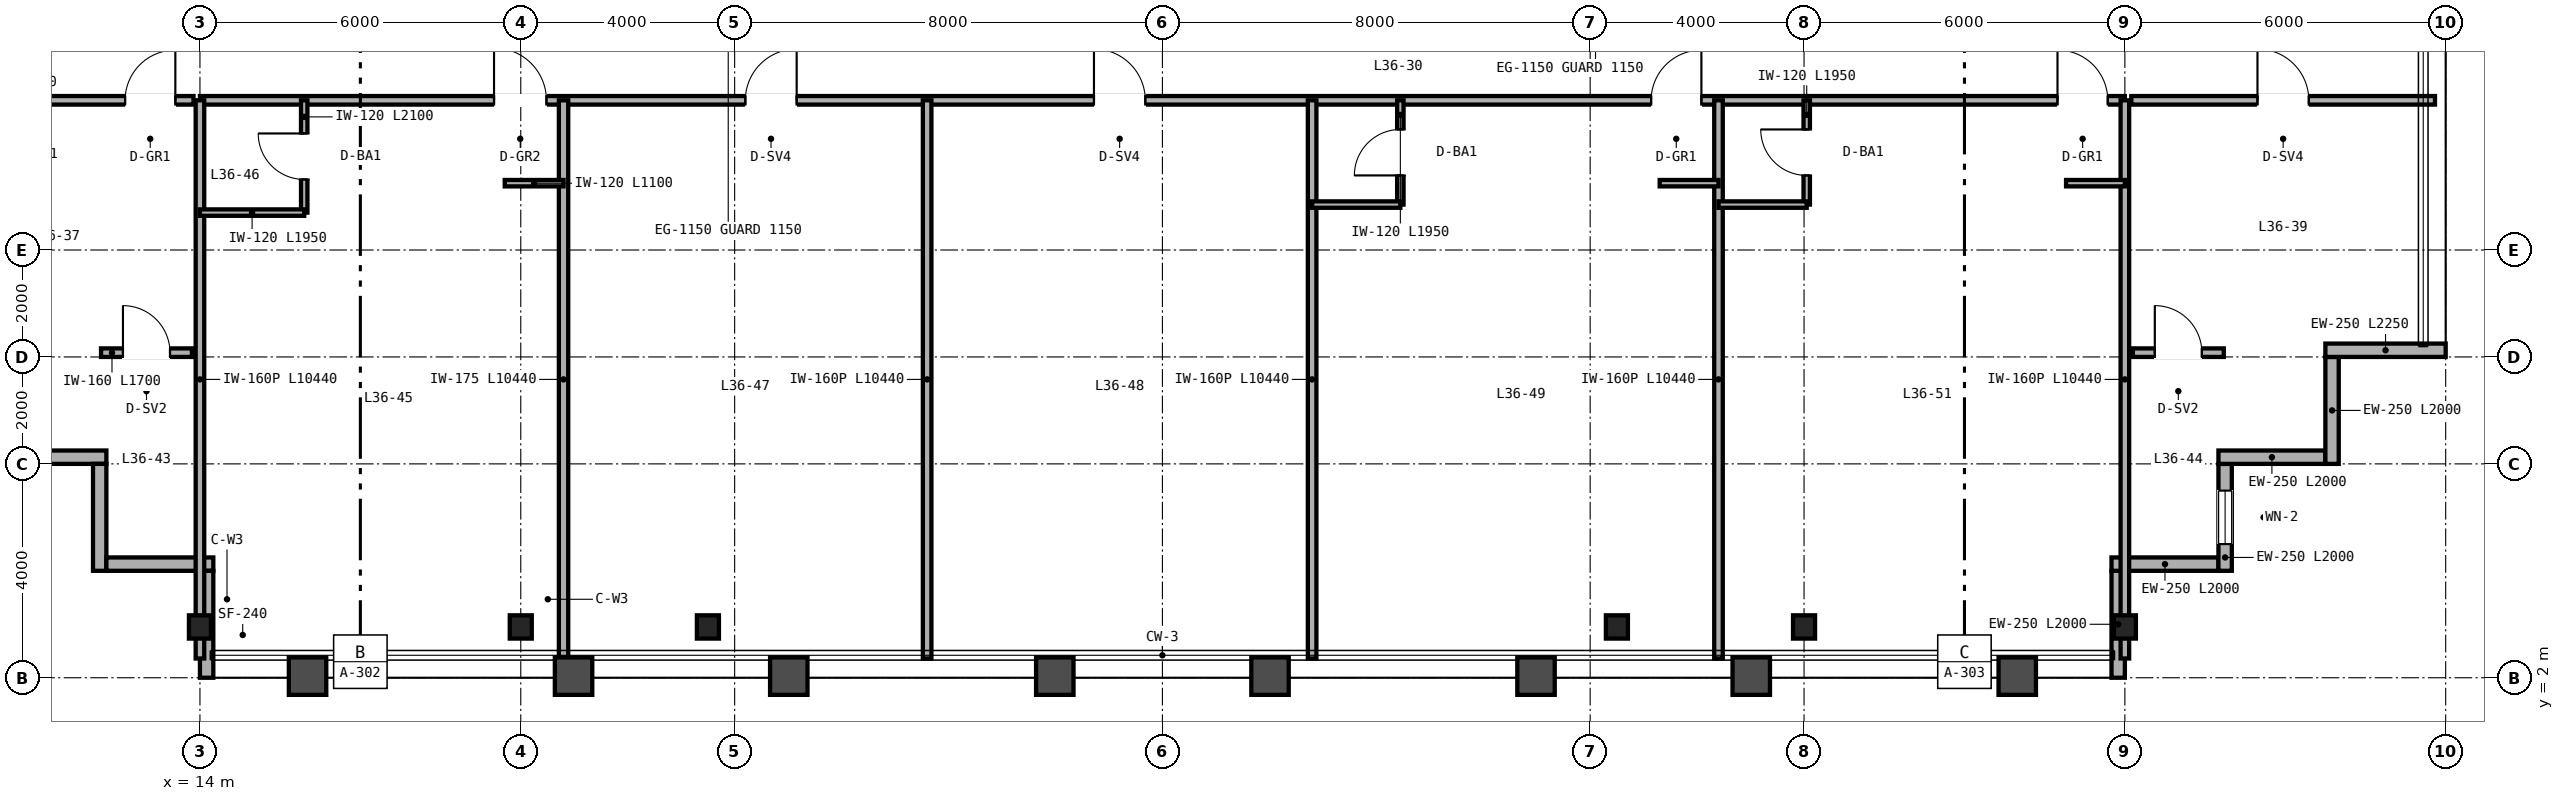
"""IFC4 building model, lengths in metres.
Left out: names, types, materials, properties, quantities, classifications, styles, units other than length and angle.
Written with IfcOpenShell. Run it as: python <this file> out.ifc"""

import sys

from ifc_helpers import new_model, si_unit, direction, frame, frame_2d, origin, origin_2d, place, context, subcontext, project, spatial, rectangle, i_section, extrude, source, transform, mapped, element, fill, save


model = new_model("IFC4")
c1 = context("Model", 3, precision=1e-05, world=origin(), true_north=direction((0.0, 1.0)))
c2 = subcontext(c1, "Body", "Model", "MODEL_VIEW")
j1 = project(units=[si_unit("LENGTHUNIT", "METRE"), si_unit("PLANEANGLEUNIT", "RADIAN")], contexts=[c1])
p1 = place(None, origin())
s1 = spatial("IfcSite", under=j1, at=p1, CompositionType="ELEMENT")
p2 = place(p1, origin())
s2 = spatial("IfcBuilding", under=s1, at=p2, CompositionType="ELEMENT")
p3 = place(p2, frame((0.0, 0.0, 144.0)))
s3 = spatial("IfcBuildingStorey", under=s2, at=p3, CompositionType="ELEMENT", Elevation=144.0)
m1 = source(origin(), c2, "Body", "SweptSolid", [
    extrude(i_section(OverallWidth=0.412, OverallDepth=0.435, WebThickness=0.036, FlangeThickness=0.057, FilletRadius=0.025, at=origin_2d()), origin(), (0.0, 0.0, 1.0), 3.36),
])
for number, where, z_axis, x_axis in (
    (1, (14.0, 2.95, 0.0), (0.0, 0.0, 1.0), (1.0, 0.0, 0.0)),
    (2, (20.0, 2.95, 0.0), (0.0, 0.0, 1.0), (1.0, 0.0, 0.0)),
    (3, (23.5, 2.95, 0.0), (0.0, 0.0, 1.0), (1.0, 0.0, 0.0)),
    (4, (40.5, 2.95, 0.0), (0.0, 0.0, 1.0), (1.0, 0.0, 0.0)),
    (5, (44.0, 2.95, 0.0), (0.0, 0.0, 1.0), (1.0, 0.0, 0.0)),
    (6, (50.0, 2.95, 0.0), (0.0, 0.0, 1.0), (1.0, 0.0, 0.0)),
):
    element("IfcColumn", number, at=place(p3, frame(where, z_axis=z_axis, x_axis=x_axis)), inside=s3, PredefinedType="COLUMN", context=c2, shape_type="MappedRepresentation", body=[
        mapped(m1, transform((0.0, 0.0, 0.0), scale=1.0)),
    ])
p4 = place(p3, frame((49.875, 2.0, 0.0), z_axis=(0.0, 0.0, 1.0), x_axis=(0.0, 1.0, 0.0)))
e7 = element("IfcWall", 7, at=p4, inside=s3, PredefinedType="SOLIDWALL", context=c2, shape_type="SweptSolid", body=[
    extrude(rectangle(XDim=2.0, YDim=0.25, at=frame_2d((1.0, 0.0))), origin(), (0.0, 0.0, 1.0), 2.667),
])
p5 = place(p3, frame((49.75, 4.125, 0.0), z_axis=(0.0, 0.0, 1.0), x_axis=(1.0, 0.0, 0.0)))
e8 = element("IfcWall", 8, at=p5, inside=s3, PredefinedType="SOLIDWALL", context=c2, shape_type="SweptSolid", body=[
    extrude(rectangle(XDim=2.0, YDim=0.25, at=frame_2d((1.0, 0.0))), origin(), (0.0, 0.0, 1.0), 3.36),
])
p6 = place(p3, frame((51.875, 4.0, 0.0), z_axis=(0.0, 0.0, 1.0), x_axis=(0.0, 1.0, 0.0)))
e9 = element("IfcWall", 9, at=p6, inside=s3, PredefinedType="SOLIDWALL", context=c2, shape_type="SweptSolid", body=[
    extrude(rectangle(XDim=2.0, YDim=0.25, at=frame_2d((1.0, 0.0))), origin(), (0.0, 0.0, 1.0), 3.36),
])
p7 = place(p6, frame((0.5, 0.0, 0.85)))
e10 = element("IfcOpeningElement", 10, at=p7, cuts=e9, PredefinedType="OPENING", context=c2, shape_type="SweptSolid", body=[
    extrude(rectangle(XDim=1.0, YDim=1.9, at=frame_2d((0.5, 0.95))), frame((0.0, 0.135, 0.0), z_axis=(0.0, -1.0, 0.0), x_axis=(1.0, 0.0, 0.0)), (0.0, 0.0, 1.0), 0.27),
])
for number, where, z_axis, x_axis in (
    (11, (51.75, 6.125, 0.0), (0.0, 0.0, 1.0), (1.0, 0.0, 0.0)),
    (12, (53.875, 6.0, 0.0), (0.0, 0.0, 1.0), (0.0, 1.0, 0.0)),
):
    element("IfcWall", number, at=place(p3, frame(where, z_axis=z_axis, x_axis=x_axis)), inside=s3, PredefinedType="SOLIDWALL", context=c2, shape_type="SweptSolid", body=[
        extrude(rectangle(XDim=2.0, YDim=0.25, at=frame_2d((1.0, 0.0))), origin(), (0.0, 0.0, 1.0), 3.36),
    ])
p8 = place(p3, frame((53.75, 8.125, 0.0), z_axis=(0.0, 0.0, 1.0), x_axis=(1.0, 0.0, 0.0)))
e13 = element("IfcWall", 13, at=p8, inside=s3, PredefinedType="SOLIDWALL", context=c2, shape_type="SweptSolid", body=[
    extrude(rectangle(XDim=2.25, YDim=0.25, at=frame_2d((1.125, 0.0))), origin(), (0.0, 0.0, 1.0), 3.36),
])
for number, where, z_axis, x_axis in (
    (14, (10.25, 6.125, 0.0), (0.0, 0.0, 1.0), (1.0, 0.0, 0.0)),
    (15, (12.125, 6.0, 0.0), (0.0, 0.0, 1.0), (0.0, -1.0, 0.0)),
    (16, (12.25, 4.125, 0.0), (0.0, 0.0, 1.0), (1.0, 0.0, 0.0)),
):
    element("IfcWall", number, at=place(p3, frame(where, z_axis=z_axis, x_axis=x_axis)), inside=s3, PredefinedType="SOLIDWALL", context=c2, shape_type="SweptSolid", body=[
        extrude(rectangle(XDim=2.0, YDim=0.25, at=frame_2d((1.0, 0.0))), origin(), (0.0, 0.0, 1.0), 3.36),
    ])
p9 = place(p3, frame((14.125, 4.0, 0.0), z_axis=(0.0, 0.0, 1.0), x_axis=(0.0, -1.0, 0.0)))
e17 = element("IfcWall", 17, at=p9, inside=s3, PredefinedType="SOLIDWALL", context=c2, shape_type="SweptSolid", body=[
    extrude(rectangle(XDim=2.0, YDim=0.25, at=frame_2d((1.0, 0.0))), origin(), (0.0, 0.0, 1.0), 2.667),
])
p10 = place(p3, frame((8.2, 12.8, 0.0), z_axis=(0.0, 0.0, 1.0), x_axis=(1.0, 0.0, 0.0)))
e18 = element("IfcWall", 18, at=p10, inside=s3, PredefinedType="PARTITIONING", context=c2, shape_type="SweptSolid", body=[
    extrude(rectangle(XDim=5.68, YDim=0.16, at=frame_2d((2.84, 0.0))), origin(), (0.0, 0.0, 1.0), 3.36),
])
p11 = place(p10, frame((4.4, 0.0, 0.0)))
e19 = element("IfcOpeningElement", 19, at=p11, cuts=e18, PredefinedType="OPENING", context=c2, shape_type="SweptSolid", body=[
    extrude(rectangle(XDim=0.94, YDim=2.15, at=frame_2d((0.47, 1.075))), frame((0.0, 0.09, 0.0), z_axis=(0.0, -1.0, 0.0), x_axis=(1.0, 0.0, 0.0)), (0.0, 0.0, 1.0), 0.18),
])
p12 = place(p3, frame((50.12, 12.8, 0.0), z_axis=(0.0, 0.0, 1.0), x_axis=(1.0, 0.0, 0.0)))
e20 = element("IfcWall", 20, at=p12, inside=s3, PredefinedType="PARTITIONING", context=c2, shape_type="SweptSolid", body=[
    extrude(rectangle(XDim=5.68, YDim=0.16, at=frame_2d((2.84, 0.0))), origin(), (0.0, 0.0, 1.0), 3.36),
])
p13 = place(p12, frame((2.36, 0.0, 0.0)))
e21 = element("IfcOpeningElement", 21, at=p13, cuts=e20, PredefinedType="OPENING", context=c2, shape_type="SweptSolid", body=[
    extrude(rectangle(XDim=0.96, YDim=2.15, at=frame_2d((0.48, 1.075))), frame((0.0, 0.09, 0.0), z_axis=(0.0, -1.0, 0.0), x_axis=(1.0, 0.0, 0.0)), (0.0, 0.0, 1.0), 0.18),
])
p14 = place(p3, frame((12.15, 8.08, 0.0), z_axis=(0.0, 0.0, 1.0), x_axis=(1.0, 0.0, 0.0)))
e22 = element("IfcWall", 22, at=p14, inside=s3, PredefinedType="PARTITIONING", context=c2, shape_type="SweptSolid", body=[
    extrude(rectangle(XDim=1.7, YDim=0.16, at=frame_2d((0.85, 0.0))), origin(), (0.0, 0.0, 1.0), 3.36),
])
p15 = place(p14, frame((0.41, 0.0, 0.0)))
e23 = element("IfcOpeningElement", 23, at=p15, cuts=e22, PredefinedType="OPENING", context=c2, shape_type="SweptSolid", body=[
    extrude(rectangle(XDim=0.88, YDim=2.15, at=frame_2d((0.44, 1.075))), frame((0.0, 0.09, 0.0), z_axis=(0.0, -1.0, 0.0), x_axis=(1.0, 0.0, 0.0)), (0.0, 0.0, 1.0), 0.18),
])
p16 = place(p3, frame((50.15, 8.08, 0.0), z_axis=(0.0, 0.0, 1.0), x_axis=(1.0, 0.0, 0.0)))
e24 = element("IfcWall", 24, at=p16, inside=s3, PredefinedType="PARTITIONING", context=c2, shape_type="SweptSolid", body=[
    extrude(rectangle(XDim=1.7, YDim=0.16, at=frame_2d((0.85, 0.0))), origin(), (0.0, 0.0, 1.0), 3.36),
])
p17 = place(p16, frame((0.41, 0.0, 0.0)))
e25 = element("IfcOpeningElement", 25, at=p17, cuts=e24, PredefinedType="OPENING", context=c2, shape_type="SweptSolid", body=[
    extrude(rectangle(XDim=0.88, YDim=2.15, at=frame_2d((0.44, 1.075))), frame((0.0, 0.09, 0.0), z_axis=(0.0, -1.0, 0.0), x_axis=(1.0, 0.0, 0.0)), (0.0, 0.0, 1.0), 0.18),
])
p18 = place(p3, frame((14.0, 12.8, 0.0), z_axis=(0.0, 0.0, 1.0), x_axis=(1.0, 0.0, 0.0)))
e26 = element("IfcWall", 26, at=p18, inside=s3, PredefinedType="PARTITIONING", context=c2, shape_type="SweptSolid", body=[
    extrude(rectangle(XDim=36.0, YDim=0.16, at=frame_2d((18.0, 0.0))), origin(), (0.0, 0.0, 1.0), 2.581),
])
p19 = place(p18, frame((5.5, 0.0, 0.0)))
e27 = element("IfcOpeningElement", 27, at=p19, cuts=e26, PredefinedType="OPENING", context=c2, shape_type="SweptSolid", body=[
    extrude(rectangle(XDim=0.98, YDim=2.2, at=frame_2d((0.49, 1.1))), frame((0.0, 0.09, 0.0), z_axis=(0.0, -1.0, 0.0), x_axis=(1.0, 0.0, 0.0)), (0.0, 0.0, 1.0), 0.18),
])
p20 = place(p18, frame((10.2, 0.0, 0.0)))
e28 = element("IfcOpeningElement", 28, at=p20, cuts=e26, PredefinedType="OPENING", context=c2, shape_type="SweptSolid", body=[
    extrude(rectangle(XDim=0.96, YDim=2.15, at=frame_2d((0.48, 1.075))), frame((0.0, 0.09, 0.0), z_axis=(0.0, -1.0, 0.0), x_axis=(1.0, 0.0, 0.0)), (0.0, 0.0, 1.0), 0.18),
])
p21 = place(p18, frame((16.72, 0.0, 0.0)))
e29 = element("IfcOpeningElement", 29, at=p21, cuts=e26, PredefinedType="OPENING", context=c2, shape_type="SweptSolid", body=[
    extrude(rectangle(XDim=0.96, YDim=2.15, at=frame_2d((0.48, 1.075))), frame((0.0, 0.09, 0.0), z_axis=(0.0, -1.0, 0.0), x_axis=(1.0, 0.0, 0.0)), (0.0, 0.0, 1.0), 0.18),
])
p22 = place(p18, frame((27.14, 0.0, 0.0)))
e30 = element("IfcOpeningElement", 30, at=p22, cuts=e26, PredefinedType="OPENING", context=c2, shape_type="SweptSolid", body=[
    extrude(rectangle(XDim=0.94, YDim=2.15, at=frame_2d((0.47, 1.075))), frame((0.0, 0.09, 0.0), z_axis=(0.0, -1.0, 0.0), x_axis=(1.0, 0.0, 0.0)), (0.0, 0.0, 1.0), 0.18),
])
p23 = place(p18, frame((34.74, 0.0, 0.0)))
e31 = element("IfcOpeningElement", 31, at=p23, cuts=e26, PredefinedType="OPENING", context=c2, shape_type="SweptSolid", body=[
    extrude(rectangle(XDim=0.94, YDim=2.15, at=frame_2d((0.47, 1.075))), frame((0.0, 0.09, 0.0), z_axis=(0.0, -1.0, 0.0), x_axis=(1.0, 0.0, 0.0)), (0.0, 0.0, 1.0), 0.18),
])
for number, where, z_axis, x_axis in (
    (32, (14.0, 2.36, 0.0), (0.0, 0.0, 1.0), (0.0, 1.0, 0.0)),
    (33, (50.0, 2.36, 0.0), (0.0, 0.0, 1.0), (0.0, 1.0, 0.0)),
):
    element("IfcWall", number, at=place(p3, frame(where, z_axis=z_axis, x_axis=x_axis)), inside=s3, PredefinedType="PARTITIONING", context=c2, shape_type="SweptSolid", body=[
        extrude(rectangle(XDim=10.44, YDim=0.16, at=frame_2d((5.22, 0.0))), origin(), (0.0, 0.0, 1.0), 2.667),
    ])
p24 = place(p3, frame((20.8, 2.36, 0.0), z_axis=(0.0, 0.0, 1.0), x_axis=(0.0, 1.0, 0.0)))
e34 = element("IfcWall", 34, at=p24, inside=s3, PredefinedType="PARTITIONING", context=c2, shape_type="SweptSolid", body=[
    extrude(rectangle(XDim=10.44, YDim=0.175, at=frame_2d((5.22, 0.0))), origin(), (0.0, 0.0, 1.0), 2.823),
])
p25 = place(p3, frame((15.95, 10.7, 0.0), z_axis=(0.0, 0.0, 1.0), x_axis=(0.0, 1.0, 0.0)))
e35 = element("IfcWall", 35, at=p25, inside=s3, PredefinedType="PARTITIONING", context=c2, shape_type="SweptSolid", body=[
    extrude(rectangle(XDim=2.1, YDim=0.12, at=frame_2d((1.05, 0.0))), origin(), (0.0, 0.0, 1.0), 3.36),
])
p26 = place(p25, frame((0.62, 0.0, 0.0)))
e36 = element("IfcOpeningElement", 36, at=p26, cuts=e35, PredefinedType="OPENING", context=c2, shape_type="SweptSolid", body=[
    extrude(rectangle(XDim=0.86, YDim=2.1, at=frame_2d((0.43, 1.05))), frame((0.0, 0.07, 0.0), z_axis=(0.0, -1.0, 0.0), x_axis=(1.0, 0.0, 0.0)), (0.0, 0.0, 1.0), 0.14),
])
p27 = place(p3, frame((14.0, 10.7, 0.0), z_axis=(0.0, 0.0, 1.0), x_axis=(1.0, 0.0, 0.0)))
e37 = element("IfcWall", 37, at=p27, inside=s3, PredefinedType="PARTITIONING", context=c2, shape_type="SweptSolid", body=[
    extrude(rectangle(XDim=1.95, YDim=0.12, at=frame_2d((0.975, 0.0))), origin(), (0.0, 0.0, 1.0), 3.36),
])
p28 = place(p3, frame((19.7, 11.25, 0.0), z_axis=(0.0, 0.0, 1.0), x_axis=(1.0, 0.0, 0.0)))
e38 = element("IfcWall", 38, at=p28, inside=s3, PredefinedType="PARTITIONING", context=c2, shape_type="SweptSolid", body=[
    extrude(rectangle(XDim=1.1, YDim=0.12, at=frame_2d((0.55, 0.0))), origin(), (0.0, 0.0, 1.0), 3.36),
])
for number, where, z_axis, x_axis in (
    (39, (27.6, 2.36, 0.0), (0.0, 0.0, 1.0), (0.0, 1.0, 0.0)),
    (40, (34.8, 2.36, 0.0), (0.0, 0.0, 1.0), (0.0, 1.0, 0.0)),
):
    element("IfcWall", number, at=place(p3, frame(where, z_axis=z_axis, x_axis=x_axis)), inside=s3, PredefinedType="PARTITIONING", context=c2, shape_type="SweptSolid", body=[
        extrude(rectangle(XDim=10.44, YDim=0.16, at=frame_2d((5.22, 0.0))), origin(), (0.0, 0.0, 1.0), 2.433),
    ])
p29 = place(p3, frame((42.4, 2.36, 0.0), z_axis=(0.0, 0.0, 1.0), x_axis=(0.0, 1.0, 0.0)))
e41 = element("IfcWall", 41, at=p29, inside=s3, PredefinedType="PARTITIONING", context=c2, shape_type="SweptSolid", body=[
    extrude(rectangle(XDim=10.44, YDim=0.16, at=frame_2d((5.22, 0.0))), origin(), (0.0, 0.0, 1.0), 2.823),
])
p30 = place(p3, frame((36.45, 10.85, 0.0), z_axis=(0.0, 0.0, 1.0), x_axis=(0.0, 1.0, 0.0)))
e42 = element("IfcWall", 42, at=p30, inside=s3, PredefinedType="PARTITIONING", context=c2, shape_type="SweptSolid", body=[
    extrude(rectangle(XDim=1.95, YDim=0.12, at=frame_2d((0.975, 0.0))), origin(), (0.0, 0.0, 1.0), 3.36),
])
p31 = place(p30, frame((0.545, 0.0, 0.0)))
e43 = element("IfcOpeningElement", 43, at=p31, cuts=e42, PredefinedType="OPENING", context=c2, shape_type="SweptSolid", body=[
    extrude(rectangle(XDim=0.86, YDim=2.1, at=frame_2d((0.43, 1.05))), frame((0.0, 0.07, 0.0), z_axis=(0.0, -1.0, 0.0), x_axis=(1.0, 0.0, 0.0)), (0.0, 0.0, 1.0), 0.14),
])
p32 = place(p3, frame((34.8, 10.85, 0.0), z_axis=(0.0, 0.0, 1.0), x_axis=(1.0, 0.0, 0.0)))
e44 = element("IfcWall", 44, at=p32, inside=s3, PredefinedType="PARTITIONING", context=c2, shape_type="SweptSolid", body=[
    extrude(rectangle(XDim=1.65, YDim=0.12, at=frame_2d((0.825, 0.0))), origin(), (0.0, 0.0, 1.0), 3.36),
])
p33 = place(p3, frame((41.3, 11.25, 0.0), z_axis=(0.0, 0.0, 1.0), x_axis=(1.0, 0.0, 0.0)))
e45 = element("IfcWall", 45, at=p33, inside=s3, PredefinedType="PARTITIONING", context=c2, shape_type="SweptSolid", body=[
    extrude(rectangle(XDim=1.1, YDim=0.12, at=frame_2d((0.55, 0.0))), origin(), (0.0, 0.0, 1.0), 3.36),
])
p34 = place(p3, frame((44.05, 10.85, 0.0), z_axis=(0.0, 0.0, 1.0), x_axis=(0.0, 1.0, 0.0)))
e46 = element("IfcWall", 46, at=p34, inside=s3, PredefinedType="PARTITIONING", context=c2, shape_type="SweptSolid", body=[
    extrude(rectangle(XDim=1.95, YDim=0.12, at=frame_2d((0.975, 0.0))), origin(), (0.0, 0.0, 1.0), 3.36),
])
p35 = place(p34, frame((0.545, 0.0, 0.0)))
e47 = element("IfcOpeningElement", 47, at=p35, cuts=e46, PredefinedType="OPENING", context=c2, shape_type="SweptSolid", body=[
    extrude(rectangle(XDim=0.86, YDim=2.1, at=frame_2d((0.43, 1.05))), frame((0.0, 0.07, 0.0), z_axis=(0.0, -1.0, 0.0), x_axis=(1.0, 0.0, 0.0)), (0.0, 0.0, 1.0), 0.14),
])
p36 = place(p3, frame((42.4, 10.85, 0.0), z_axis=(0.0, 0.0, 1.0), x_axis=(1.0, 0.0, 0.0)))
e48 = element("IfcWall", 48, at=p36, inside=s3, PredefinedType="PARTITIONING", context=c2, shape_type="SweptSolid", body=[
    extrude(rectangle(XDim=1.65, YDim=0.12, at=frame_2d((0.825, 0.0))), origin(), (0.0, 0.0, 1.0), 3.36),
])
p37 = place(p3, frame((48.9, 11.25, 0.0), z_axis=(0.0, 0.0, 1.0), x_axis=(1.0, 0.0, 0.0)))
e49 = element("IfcWall", 49, at=p37, inside=s3, PredefinedType="PARTITIONING", context=c2, shape_type="SweptSolid", body=[
    extrude(rectangle(XDim=1.1, YDim=0.12, at=frame_2d((0.55, 0.0))), origin(), (0.0, 0.0, 1.0), 3.36),
])
m2 = source(origin(), c2, "Body", "SweptSolid", [
    extrude(rectangle(XDim=1.0, YDim=1.9, at=frame_2d((0.5, 0.95))), frame((0.0, 0.03, 0.0), z_axis=(0.0, -1.0, 0.0), x_axis=(1.0, 0.0, 0.0)), (0.0, 0.0, 1.0), 0.06),
])
p38 = place(p7, origin())
e50 = element("IfcWindow", 50, at=p38, inside=s3, PartitioningType="SINGLE_PANEL", PredefinedType="WINDOW", context=c2, shape_type="MappedRepresentation", body=[
    mapped(m2, transform((0.0, 0.0, 0.0), scale=1.0)),
])
fill(e10, e50)
m3 = source(origin(), c2, "Body", "SweptSolid", [
    extrude(rectangle(XDim=0.94, YDim=2.15, at=frame_2d((0.47, 1.075))), frame((0.0, 0.025, 0.0), z_axis=(0.0, -1.0, 0.0), x_axis=(1.0, 0.0, 0.0)), (0.0, 0.0, 1.0), 0.05),
])
p39 = place(p11, origin())
e51 = element("IfcDoor", 51, at=p39, inside=s3, OperationType="SINGLE_SWING_RIGHT", PredefinedType="DOOR", context=c2, shape_type="MappedRepresentation", body=[
    mapped(m3, transform((0.0, 0.0, 0.0), scale=1.0)),
])
fill(e19, e51)
m4 = source(origin(), c2, "Body", "SweptSolid", [
    extrude(rectangle(XDim=0.96, YDim=2.15, at=frame_2d((0.48, 1.075))), frame((0.0, 0.025, 0.0), z_axis=(0.0, -1.0, 0.0), x_axis=(1.0, 0.0, 0.0)), (0.0, 0.0, 1.0), 0.05),
])
p40 = place(p13, origin())
e52 = element("IfcDoor", 52, at=p40, inside=s3, OperationType="SINGLE_SWING_LEFT", PredefinedType="DOOR", context=c2, shape_type="MappedRepresentation", body=[
    mapped(m4, transform((0.0, 0.0, 0.0), scale=1.0)),
])
fill(e21, e52)
m5 = source(origin(), c2, "Body", "SweptSolid", [
    extrude(rectangle(XDim=0.88, YDim=2.15, at=frame_2d((0.44, 1.075))), frame((0.0, 0.025, 0.0), z_axis=(0.0, -1.0, 0.0), x_axis=(1.0, 0.0, 0.0)), (0.0, 0.0, 1.0), 0.05),
])
p41 = place(p15, origin())
e53 = element("IfcDoor", 53, at=p41, inside=s3, OperationType="SINGLE_SWING_LEFT", PredefinedType="DOOR", context=c2, shape_type="MappedRepresentation", body=[
    mapped(m5, transform((0.0, 0.0, 0.0), scale=1.0)),
])
fill(e23, e53)
p42 = place(p17, origin())
e54 = element("IfcDoor", 54, at=p42, inside=s3, OperationType="SINGLE_SWING_LEFT", PredefinedType="DOOR", context=c2, shape_type="MappedRepresentation", body=[
    mapped(m5, transform((0.0, 0.0, 0.0), scale=1.0)),
])
fill(e25, e54)
m6 = source(origin(), c2, "Body", "SweptSolid", [
    extrude(rectangle(XDim=0.86, YDim=2.1, at=frame_2d((0.43, 1.05))), frame((0.0, 0.025, 0.0), z_axis=(0.0, -1.0, 0.0), x_axis=(1.0, 0.0, 0.0)), (0.0, 0.0, 1.0), 0.05),
])
p43 = place(p26, origin())
e55 = element("IfcDoor", 55, at=p43, inside=s3, OperationType="SINGLE_SWING_RIGHT", PredefinedType="DOOR", context=c2, shape_type="MappedRepresentation", body=[
    mapped(m6, transform((0.0, 0.0, 0.0), scale=1.0)),
])
fill(e36, e55)
p44 = place(p31, origin())
e56 = element("IfcDoor", 56, at=p44, inside=s3, OperationType="SINGLE_SWING_LEFT", PredefinedType="DOOR", context=c2, shape_type="MappedRepresentation", body=[
    mapped(m6, transform((0.0, 0.0, 0.0), scale=1.0)),
])
fill(e43, e56)
p45 = place(p35, origin())
e57 = element("IfcDoor", 57, at=p45, inside=s3, OperationType="SINGLE_SWING_RIGHT", PredefinedType="DOOR", context=c2, shape_type="MappedRepresentation", body=[
    mapped(m6, transform((0.0, 0.0, 0.0), scale=1.0)),
])
fill(e47, e57)
m7 = source(origin(), c2, "Body", "SweptSolid", [
    extrude(rectangle(XDim=0.98, YDim=2.2, at=frame_2d((0.49, 1.1))), frame((0.0, 0.025, 0.0), z_axis=(0.0, -1.0, 0.0), x_axis=(1.0, 0.0, 0.0)), (0.0, 0.0, 1.0), 0.05),
])
p46 = place(p19, origin())
e58 = element("IfcDoor", 58, at=p46, inside=s3, OperationType="SINGLE_SWING_LEFT", PredefinedType="DOOR", context=c2, shape_type="MappedRepresentation", body=[
    mapped(m7, transform((0.0, 0.0, 0.0), scale=1.0)),
])
fill(e27, e58)
p47 = place(p20, origin())
e59 = element("IfcDoor", 59, at=p47, inside=s3, OperationType="SINGLE_SWING_RIGHT", PredefinedType="DOOR", context=c2, shape_type="MappedRepresentation", body=[
    mapped(m4, transform((0.0, 0.0, 0.0), scale=1.0)),
])
fill(e28, e59)
p48 = place(p21, origin())
e60 = element("IfcDoor", 60, at=p48, inside=s3, OperationType="SINGLE_SWING_LEFT", PredefinedType="DOOR", context=c2, shape_type="MappedRepresentation", body=[
    mapped(m4, transform((0.0, 0.0, 0.0), scale=1.0)),
])
fill(e29, e60)
p49 = place(p22, origin())
e61 = element("IfcDoor", 61, at=p49, inside=s3, OperationType="SINGLE_SWING_RIGHT", PredefinedType="DOOR", context=c2, shape_type="MappedRepresentation", body=[
    mapped(m3, transform((0.0, 0.0, 0.0), scale=1.0)),
])
fill(e30, e61)
p50 = place(p23, origin())
e62 = element("IfcDoor", 62, at=p50, inside=s3, OperationType="SINGLE_SWING_LEFT", PredefinedType="DOOR", context=c2, shape_type="MappedRepresentation", body=[
    mapped(m3, transform((0.0, 0.0, 0.0), scale=1.0)),
])
fill(e31, e62)
save(model, sys.argv[1])
